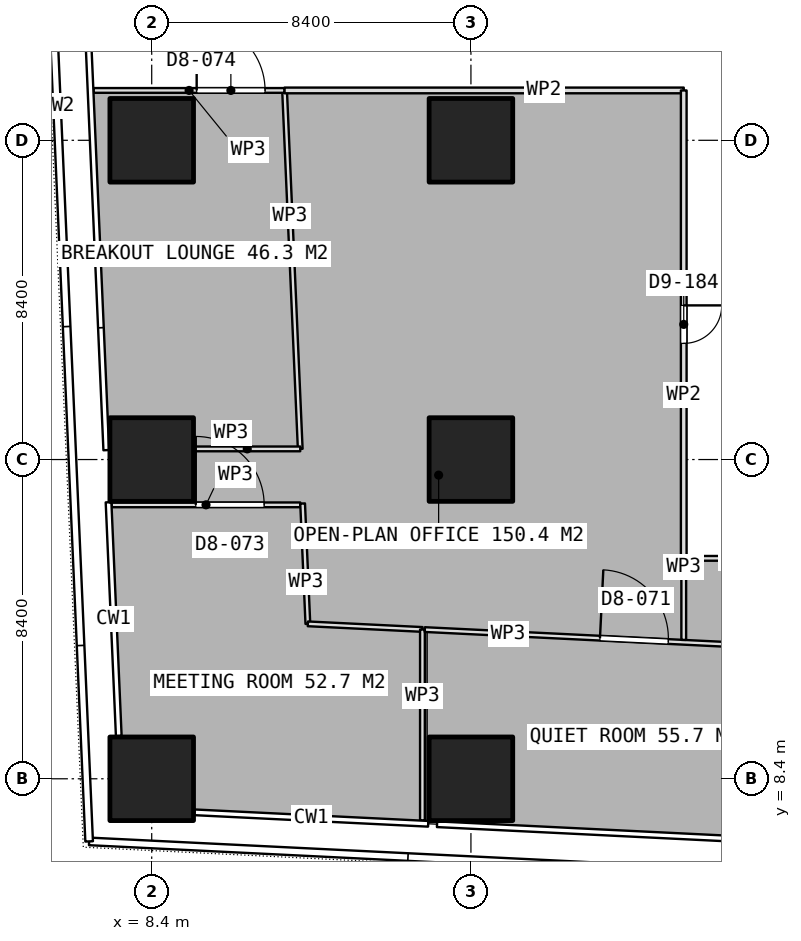
"""IFC4 building model, lengths in metres.
Left out: names, types, materials, properties, quantities, classifications, styles, units other than length and angle.
Written with IfcOpenShell. Run it as: python <this file> out.ifc"""

import sys

from ifc_helpers import new_model, si_unit, direction, frame, frame_2d, origin, origin_2d, place, context, subcontext, project, spatial, rectangle, extrude, element, fill, save


model = new_model("IFC4")
c1 = context("Model", 3, precision=1e-05, world=origin(), true_north=direction((0.0, 1.0)))
c2 = subcontext(c1, "Body", "Model", "MODEL_VIEW")
j1 = project(units=[si_unit("LENGTHUNIT", "METRE"), si_unit("PLANEANGLEUNIT", "RADIAN")], contexts=[c1])
p1 = place(None, origin())
s1 = spatial("IfcSite", under=j1, at=p1, CompositionType="ELEMENT")
p2 = place(p1, origin())
s2 = spatial("IfcBuilding", under=s1, at=p2, CompositionType="ELEMENT")
p3 = place(p2, frame((0.0, 0.0, 59.15)))
s3 = spatial("IfcBuildingStorey", under=s2, at=p3, CompositionType="ELEMENT", Elevation=59.15)
for number, where, z_axis, x_axis in (
    (1, (8.4, 8.4, 0.0), (0.0, 0.0, 1.0), (1.0, 0.0, 0.0)),
    (2, (8.4, 16.8, 0.0), (0.0, 0.0, 1.0), (1.0, 0.0, 0.0)),
    (3, (8.4, 25.2, 0.0), (0.0, 0.0, 1.0), (1.0, 0.0, 0.0)),
    (4, (16.8, 8.4, 0.0), (0.0, 0.0, 1.0), (1.0, 0.0, 0.0)),
    (5, (16.8, 16.8, 0.0), (0.0, 0.0, 1.0), (1.0, 0.0, 0.0)),
    (6, (16.8, 25.2, 0.0), (0.0, 0.0, 1.0), (1.0, 0.0, 0.0)),
):
    element("IfcColumn", number, at=place(p3, frame(where, z_axis=z_axis, x_axis=x_axis)), inside=s3, PredefinedType="COLUMN", context=c2, shape_type="SweptSolid", body=[
        extrude(rectangle(XDim=2.2, YDim=2.2, at=origin_2d()), origin(), (0.0, 0.0, 1.0), 3.75),
    ])
p4 = place(p3, frame((11.896, 26.512, 0.0), z_axis=(0.0, 0.0, 1.0), x_axis=(0.043651567972, -0.999046816027, 0.0)))
e7 = element("IfcWall", 7, at=p4, inside=s3, PredefinedType="PARTITIONING", context=c2, shape_type="SweptSolid", body=[
    extrude(rectangle(XDim=9.441, YDim=0.125, at=frame_2d((4.72, 0.0))), origin(), (0.0, 0.0, 1.0), 3.5),
])
p5 = place(p3, frame((12.308, 17.08, 0.0), z_axis=(0.0, 0.0, 1.0), x_axis=(-1.0, 0.0, 0.0)))
e8 = element("IfcWall", 8, at=p5, inside=s3, PredefinedType="PARTITIONING", context=c2, shape_type="SweptSolid", body=[
    extrude(rectangle(XDim=2.788, YDim=0.125, at=frame_2d((1.394, 0.0))), origin(), (0.0, 0.0, 1.0), 3.5),
])
p6 = place(p3, frame((6.871, 26.512, 0.0), z_axis=(0.0, 0.0, 1.0), x_axis=(1.0, 0.0, 0.0)))
e9 = element("IfcWall", 9, at=p6, inside=s3, PredefinedType="PARTITIONING", context=c2, shape_type="SweptSolid", body=[
    extrude(rectangle(XDim=5.025, YDim=0.125, at=frame_2d((2.512, 0.0))), origin(), (0.0, 0.0, 1.0), 3.5),
])
p7 = place(p6, frame((2.712, 0.0, 0.0)))
e10 = element("IfcOpeningElement", 10, at=p7, cuts=e9, PredefinedType="OPENING", context=c2, shape_type="SweptSolid", body=[
    extrude(rectangle(XDim=1.8, YDim=2.1, at=frame_2d((0.9, 1.05))), frame((0.0, 0.073, 0.0), z_axis=(0.0, -1.0, 0.0), x_axis=(1.0, 0.0, 0.0)), (0.0, 0.0, 1.0), 0.145),
])
p8 = place(p3, frame((7.347, 15.608, 0.0), z_axis=(0.0, 0.0, 1.0), x_axis=(1.0, 0.0, 0.0)))
e11 = element("IfcWall", 11, at=p8, inside=s3, PredefinedType="PARTITIONING", context=c2, shape_type="SweptSolid", body=[
    extrude(rectangle(XDim=4.963, YDim=0.125, at=frame_2d((2.481, 0.0))), origin(), (0.0, 0.0, 1.0), 3.5),
])
p9 = place(p8, frame((2.212, 0.0, 0.0)))
e12 = element("IfcOpeningElement", 12, at=p9, cuts=e11, PredefinedType="OPENING", context=c2, shape_type="SweptSolid", body=[
    extrude(rectangle(XDim=1.8, YDim=2.1, at=frame_2d((0.9, 1.05))), frame((0.0, 0.073, 0.0), z_axis=(0.0, -1.0, 0.0), x_axis=(1.0, 0.0, 0.0)), (0.0, 0.0, 1.0), 0.145),
])
p10 = place(p3, frame((12.371, 15.643, 0.0), z_axis=(0.0, 0.0, 1.0), x_axis=(0.043527491497, -0.999052229608, 0.0)))
e13 = element("IfcWall", 13, at=p10, inside=s3, PredefinedType="PARTITIONING", context=c2, shape_type="SweptSolid", body=[
    extrude(rectangle(XDim=3.169, YDim=0.125, at=frame_2d((1.584, 0.0))), origin(), (0.0, 0.0, 1.0), 3.5),
])
p11 = place(p3, frame((12.509, 12.477, 0.0), z_axis=(0.0, 0.0, 1.0), x_axis=(0.9987981005, -0.049013818844, 0.0)))
e14 = element("IfcWall", 14, at=p11, inside=s3, PredefinedType="PARTITIONING", context=c2, shape_type="SweptSolid", body=[
    extrude(rectangle(XDim=3.019, YDim=0.125, at=frame_2d((1.509, 0.0))), origin(), (0.0, 0.0, 1.0), 3.5),
])
p12 = place(p3, frame((15.524, 12.329, 0.0), z_axis=(0.0, 0.0, 1.0), x_axis=(0.0, -1.0, 0.0)))
e15 = element("IfcWall", 15, at=p12, inside=s3, PredefinedType="PARTITIONING", context=c2, shape_type="SweptSolid", body=[
    extrude(rectangle(XDim=5.026, YDim=0.125, at=frame_2d((2.513, 0.0))), origin(), (0.0, 0.0, 1.0), 3.5),
])
p13 = place(p3, frame((15.586, 12.326, 0.0), z_axis=(0.0, 0.0, 1.0), x_axis=(0.998798341691, -0.04900890364, 0.0)))
e16 = element("IfcWall", 16, at=p13, inside=s3, PredefinedType="PARTITIONING", context=c2, shape_type="SweptSolid", body=[
    extrude(rectangle(XDim=10.974, YDim=0.125, at=frame_2d((5.487, 0.0))), origin(), (0.0, 0.0, 1.0), 3.5),
])
p14 = place(p13, frame((4.615, 0.0, 0.0)))
e17 = element("IfcOpeningElement", 17, at=p14, cuts=e16, PredefinedType="OPENING", context=c2, shape_type="SweptSolid", body=[
    extrude(rectangle(XDim=1.8, YDim=2.1, at=frame_2d((0.9, 1.05))), frame((0.0, 0.073, 0.0), z_axis=(0.0, -1.0, 0.0), x_axis=(1.0, 0.0, 0.0)), (0.0, 0.0, 1.0), 0.145),
])
p15 = place(p3, frame((22.4, 12.054, 0.0), z_axis=(0.0, 0.0, 1.0), x_axis=(0.0, 1.0, 0.0)))
e18 = element("IfcWall", 18, at=p15, inside=s3, PredefinedType="PARTITIONING", context=c2, shape_type="SweptSolid", body=[
    extrude(rectangle(XDim=2.146, YDim=0.125, at=frame_2d((1.073, 0.0))), origin(), (0.0, 0.0, 1.0), 3.5),
])
p16 = place(p3, frame((22.4, 14.2, 0.0), z_axis=(0.0, 0.0, 1.0), x_axis=(1.0, 0.0, 0.0)))
e19 = element("IfcWall", 19, at=p16, inside=s3, PredefinedType="PARTITIONING", context=c2, shape_type="SweptSolid", body=[
    extrude(rectangle(XDim=7.2, YDim=0.125, at=frame_2d((3.6, 0.0))), origin(), (0.0, 0.0, 1.0), 3.5),
])
p17 = place(p16, frame((3.1, 0.0, 0.0)))
e20 = element("IfcOpeningElement", 20, at=p17, cuts=e19, PredefinedType="OPENING", context=c2, shape_type="SweptSolid", body=[
    extrude(rectangle(XDim=1.0, YDim=2.1, at=frame_2d((0.5, 1.05))), frame((0.0, 0.073, 0.0), z_axis=(0.0, -1.0, 0.0), x_axis=(1.0, 0.0, 0.0)), (0.0, 0.0, 1.0), 0.145),
])
p18 = place(p3, frame((11.896, 26.512, 0.0), z_axis=(0.0, 0.0, 1.0), x_axis=(1.0, 0.0, 0.0)))
e21 = element("IfcWall", 21, at=p18, inside=s3, PredefinedType="PARTITIONING", context=c2, shape_type="SweptSolid", body=[
    extrude(rectangle(XDim=10.504, YDim=0.15, at=frame_2d((5.252, 0.0))), origin(), (0.0, 0.0, 1.0), 3.5),
])
p19 = place(p3, frame((22.4, 26.512, 0.0), z_axis=(0.0, 0.0, 1.0), x_axis=(0.0, -1.0, 0.0)))
e22 = element("IfcWall", 22, at=p19, inside=s3, PredefinedType="PARTITIONING", context=c2, shape_type="SweptSolid", body=[
    extrude(rectangle(XDim=12.312, YDim=0.15, at=frame_2d((6.156, 0.0))), origin(), (0.0, 0.0, 1.0), 3.5),
])
p20 = place(p19, frame((5.656, 0.0, 0.0)))
e23 = element("IfcOpeningElement", 23, at=p20, cuts=e22, PredefinedType="OPENING", context=c2, shape_type="SweptSolid", body=[
    extrude(rectangle(XDim=1.0, YDim=2.1, at=frame_2d((0.5, 1.05))), frame((0.0, 0.085, 0.0), z_axis=(0.0, -1.0, 0.0), x_axis=(1.0, 0.0, 0.0)), (0.0, 0.0, 1.0), 0.17),
])
p21 = place(p7, origin())
e24 = element("IfcDoor", 24, at=p21, inside=s3, OperationType="DOUBLE_DOOR_SINGLE_SWING", PredefinedType="DOOR", context=c2, shape_type="SweptSolid", body=[
    extrude(rectangle(XDim=1.8, YDim=2.1, at=frame_2d((0.9, 1.05))), frame((0.0, 0.025, 0.0), z_axis=(0.0, -1.0, 0.0), x_axis=(1.0, 0.0, 0.0)), (0.0, 0.0, 1.0), 0.05),
])
fill(e10, e24)
p22 = place(p9, origin())
e25 = element("IfcDoor", 25, at=p22, inside=s3, OperationType="DOUBLE_DOOR_SINGLE_SWING", PredefinedType="DOOR", context=c2, shape_type="SweptSolid", body=[
    extrude(rectangle(XDim=1.8, YDim=2.1, at=frame_2d((0.9, 1.05))), frame((0.0, 0.025, 0.0), z_axis=(0.0, -1.0, 0.0), x_axis=(1.0, 0.0, 0.0)), (0.0, 0.0, 1.0), 0.05),
])
fill(e12, e25)
p23 = place(p14, origin())
e26 = element("IfcDoor", 26, at=p23, inside=s3, OperationType="DOUBLE_DOOR_SINGLE_SWING", PredefinedType="DOOR", context=c2, shape_type="SweptSolid", body=[
    extrude(rectangle(XDim=1.8, YDim=2.1, at=frame_2d((0.9, 1.05))), frame((0.0, 0.025, 0.0), z_axis=(0.0, -1.0, 0.0), x_axis=(1.0, 0.0, 0.0)), (0.0, 0.0, 1.0), 0.05),
])
fill(e17, e26)
p24 = place(p20, origin())
e27 = element("IfcDoor", 27, at=p24, inside=s3, OperationType="SINGLE_SWING_LEFT", PredefinedType="DOOR", context=c2, shape_type="SweptSolid", body=[
    extrude(rectangle(XDim=1.0, YDim=2.1, at=frame_2d((0.5, 1.05))), frame((0.0, 0.025, 0.0), z_axis=(0.0, -1.0, 0.0), x_axis=(1.0, 0.0, 0.0)), (0.0, 0.0, 1.0), 0.05),
])
fill(e23, e27)
save(model, sys.argv[1])
